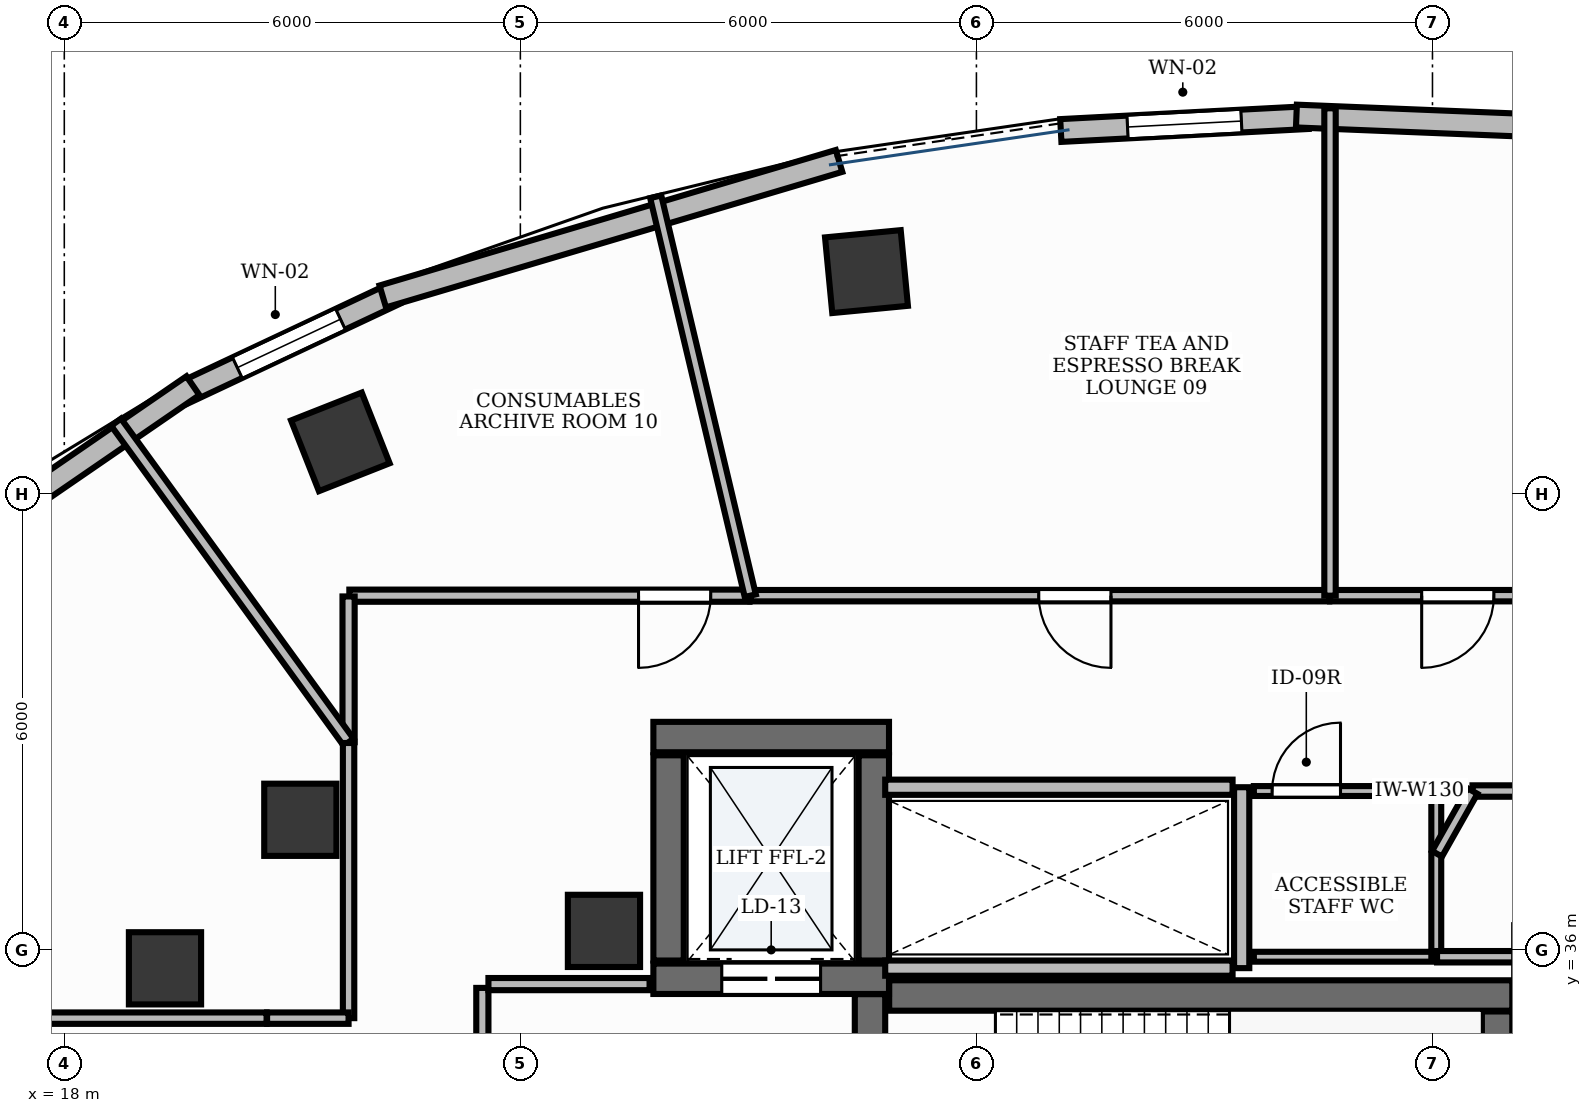
"""IFC4 building model, lengths in metres.
Left out: names, types, materials, properties, quantities, classifications, styles, units other than length and angle.
Written with IfcOpenShell. Run it as: python <this file> out.ifc"""

import sys

from ifc_helpers import new_model, si_unit, direction, frame, frame_2d, origin, origin_2d, place, context, subcontext, project, spatial, rectangle, extrude, element, fill, save


model = new_model("IFC4")
c1 = context("Model", 3, precision=1e-05, world=origin(), true_north=direction((0.0, 1.0)))
c2 = subcontext(c1, "Body", "Model", "MODEL_VIEW")
j1 = project(units=[si_unit("LENGTHUNIT", "METRE"), si_unit("PLANEANGLEUNIT", "RADIAN")], contexts=[c1])
p1 = place(None, origin())
s1 = spatial("IfcSite", under=j1, at=p1, CompositionType="ELEMENT")
p2 = place(p1, origin())
s2 = spatial("IfcBuilding", under=s1, at=p2, CompositionType="ELEMENT")
p3 = place(p2, frame((0.0, 0.0, 200.4)))
s3 = spatial("IfcBuildingStorey", under=s2, at=p3, CompositionType="ELEMENT", Elevation=200.4)
p4 = place(p3, frame((28.852, 35.4, 0.0), z_axis=(0.0, 0.0, 1.0), x_axis=(1.0, 0.0, 0.0)))
e1 = element("IfcWall", 1, at=p4, inside=s3, PredefinedType="SHEAR", context=c2, shape_type="SweptSolid", body=[
    extrude(rectangle(XDim=8.198, YDim=0.4, at=frame_2d((4.099, 0.0))), origin(), (0.0, 0.0, 1.0), 3.9),
])
p5 = place(p3, frame((36.85, 32.11, 0.0), z_axis=(0.0, 0.0, 1.0), x_axis=(0.0, 1.0, 0.0)))
e2 = element("IfcWall", 2, at=p5, inside=s3, PredefinedType="SHEAR", context=c2, shape_type="SweptSolid", body=[
    extrude(rectangle(XDim=3.08, YDim=0.4, at=frame_2d((1.54, 0.0))), origin(), (0.0, 0.0, 1.0), 3.9),
])
p6 = place(p3, frame((28.6, 32.11, 0.0), z_axis=(0.0, 0.0, 1.0), x_axis=(0.0, 1.0, 0.0)))
e3 = element("IfcWall", 3, at=p6, inside=s3, PredefinedType="SHEAR", context=c2, shape_type="SweptSolid", body=[
    extrude(rectangle(XDim=3.308, YDim=0.4, at=frame_2d((1.654, 0.0))), origin(), (0.0, 0.0, 1.0), 3.9),
])
p7 = place(p6, frame((0.2, 0.0, 0.0)))
e4 = element("IfcOpeningElement", 4, at=p7, cuts=e3, PredefinedType="OPENING", context=c2, shape_type="SweptSolid", body=[
    extrude(rectangle(XDim=1.05, YDim=2.15, at=frame_2d((0.525, 1.075))), frame((0.0, 0.215, 0.0), z_axis=(0.0, -1.0, 0.0), x_axis=(1.0, 0.0, 0.0)), (0.0, 0.0, 1.0), 0.43),
])
p8 = place(p3, frame((25.75, 38.8, 0.0), z_axis=(0.0, 0.0, 1.0), x_axis=(1.0, 0.0, 0.0)))
e5 = element("IfcWall", 5, at=p8, inside=s3, PredefinedType="SHEAR", context=c2, shape_type="SweptSolid", body=[
    extrude(rectangle(XDim=3.1, YDim=0.4, at=frame_2d((1.55, 0.0))), origin(), (0.0, 0.0, 1.0), 3.9),
])
p9 = place(p3, frame((25.75, 35.62, 0.0), z_axis=(0.0, 0.0, 1.0), x_axis=(1.0, 0.0, 0.0)))
e6 = element("IfcWall", 6, at=p9, inside=s3, PredefinedType="SHEAR", context=c2, shape_type="SweptSolid", body=[
    extrude(rectangle(XDim=3.1, YDim=0.4, at=frame_2d((1.55, 0.0))), origin(), (0.0, 0.0, 1.0), 3.9),
])
p10 = place(p9, frame((0.9, 0.0, 0.0)))
e7 = element("IfcOpeningElement", 7, at=p10, cuts=e6, PredefinedType="OPENING", context=c2, shape_type="SweptSolid", body=[
    extrude(rectangle(XDim=1.3, YDim=2.2, at=frame_2d((0.65, 1.1))), frame((0.0, 0.215, 0.0), z_axis=(0.0, -1.0, 0.0), x_axis=(1.0, 0.0, 0.0)), (0.0, 0.0, 1.0), 0.43),
])
for number, where, z_axis, x_axis in (
    (8, (25.95, 35.86, 0.0), (0.0, 0.0, 1.0), (0.0, 1.0, 0.0)),
    (9, (28.65, 35.86, 0.0), (0.0, 0.0, 1.0), (0.0, 1.0, 0.0)),
):
    element("IfcWall", number, at=place(p3, frame(where, z_axis=z_axis, x_axis=x_axis)), inside=s3, PredefinedType="SHEAR", context=c2, shape_type="SweptSolid", body=[
        extrude(rectangle(XDim=2.7, YDim=0.4, at=frame_2d((1.35, 0.0))), origin(), (0.0, 0.0, 1.0), 3.9),
    ])
p11 = place(p3, frame((25.1, 36.25, -0.0), z_axis=(0.0, 0.0, 1.0), x_axis=(1.0, 0.0, 0.0)))
e10 = element("IfcColumn", 10, at=p11, inside=s3, PredefinedType="PILASTER", context=c2, shape_type="SweptSolid", body=[
    extrude(rectangle(XDim=0.95, YDim=0.95, at=origin_2d()), origin(), (0.0, 0.0, 1.0), 3.901),
])
for number, where, z_axis, x_axis in (
    (11, (28.554, 44.924, -0.0), (0.0, 0.0, 1.0), (0.995, 0.095, 0.0)),
    (12, (21.632, 42.684, -0.0), (0.0, 0.0, 1.0), (0.93, 0.367, 0.0)),
):
    element("IfcColumn", number, at=place(p3, frame(where, z_axis=z_axis, x_axis=x_axis)), inside=s3, PredefinedType="COLUMN", context=c2, shape_type="SweptSolid", body=[
        extrude(rectangle(XDim=1.0, YDim=1.0, at=origin_2d()), origin(), (0.0, 0.0, 1.0), 3.901),
    ])
for number, where, z_axis, x_axis in (
    (13, (21.105, 37.712, -0.0), (0.0, 0.0, 1.0), (1.0, 0.0, 0.0)),
    (14, (19.325, 35.758, -0.0), (0.0, 0.0, 1.0), (1.0, 0.0, 0.0)),
):
    element("IfcColumn", number, at=place(p3, frame(where, z_axis=z_axis, x_axis=x_axis)), inside=s3, PredefinedType="COLUMN", context=c2, shape_type="SweptSolid", body=[
        extrude(rectangle(XDim=0.95, YDim=0.95, at=origin_2d()), origin(), (0.0, 0.0, 1.0), 3.901),
    ])
p12 = place(p3, frame((34.364, 46.95, 0.0), z_axis=(0.0, 0.0, 1.0), x_axis=(-0.998635162507, -0.052228461639, 0.0)))
e15 = element("IfcWall", 15, at=p12, inside=s3, PredefinedType="STANDARD", context=c2, shape_type="SweptSolid", body=[
    extrude(rectangle(XDim=3.258, YDim=0.3, at=frame_2d((1.629, 0.0))), origin(), (0.0, 0.0, 1.0), 3.9),
])
p13 = place(p12, frame((0.879, 0.0, 0.95)))
e16 = element("IfcOpeningElement", 16, at=p13, cuts=e15, PredefinedType="OPENING", context=c2, shape_type="SweptSolid", body=[
    extrude(rectangle(XDim=1.5, YDim=1.8, at=frame_2d((0.75, 0.9))), frame((0.0, 0.165, 0.0), z_axis=(0.0, -1.0, 0.0), x_axis=(1.0, 0.0, 0.0)), (0.0, 0.0, 1.0), 0.33),
])
p14 = place(p3, frame((22.349, 44.634, 0.0), z_axis=(0.0, 0.0, 1.0), x_axis=(-0.904928207817, -0.425564259188, 0.0)))
e17 = element("IfcWall", 17, at=p14, inside=s3, PredefinedType="STANDARD", context=c2, shape_type="SweptSolid", body=[
    extrude(rectangle(XDim=3.081, YDim=0.3, at=frame_2d((1.541, 0.0))), origin(), (0.0, 0.0, 1.0), 3.47),
])
p15 = place(p14, frame((0.791, 0.0, 0.95)))
e18 = element("IfcOpeningElement", 18, at=p15, cuts=e17, PredefinedType="OPENING", context=c2, shape_type="SweptSolid", body=[
    extrude(rectangle(XDim=1.5, YDim=1.8, at=frame_2d((0.75, 0.9))), frame((0.0, 0.165, 0.0), z_axis=(0.0, -1.0, 0.0), x_axis=(1.0, 0.0, 0.0)), (0.0, 0.0, 1.0), 0.33),
])
p16 = place(p3, frame((37.507, 46.837, 0.0), z_axis=(0.0, 0.0, 1.0), x_axis=(-0.999186472466, 0.040328566059, 0.0)))
e19 = element("IfcWall", 19, at=p16, inside=s3, PredefinedType="STANDARD", context=c2, shape_type="SweptSolid", body=[
    extrude(rectangle(XDim=3.299, YDim=0.3, at=frame_2d((1.65, 0.0))), origin(), (0.0, 0.0, 1.0), 3.9),
])
p17 = place(p3, frame((28.193, 46.379, 0.0), z_axis=(0.0, 0.0, 1.0), x_axis=(-0.95862409447, -0.28467498222, 0.0)))
e20 = element("IfcWall", 20, at=p17, inside=s3, PredefinedType="STANDARD", context=c2, shape_type="SweptSolid", body=[
    extrude(rectangle(XDim=6.262, YDim=0.3, at=frame_2d((3.131, 0.0))), origin(), (0.0, 0.0, 1.0), 3.47),
])
p18 = place(p3, frame((19.692, 43.423, 0.0), z_axis=(0.0, 0.0, 1.0), x_axis=(-0.824151800961, -0.566368968935, 0.0)))
e21 = element("IfcWall", 21, at=p18, inside=s3, PredefinedType="STANDARD", context=c2, shape_type="SweptSolid", body=[
    extrude(rectangle(XDim=5.834, YDim=0.3, at=frame_2d((2.917, 0.0))), origin(), (0.0, 0.0, 1.0), 3.9),
])
p19 = place(p3, frame((33.49, 35.76, 0.0), z_axis=(0.0, 0.0, 1.0), x_axis=(0.0, 1.0, 0.0)))
e22 = element("IfcWall", 22, at=p19, inside=s3, PredefinedType="PARTITIONING", context=c2, shape_type="SweptSolid", body=[
    extrude(rectangle(XDim=2.38, YDim=0.2, at=frame_2d((1.19, 0.0))), origin(), (0.0, 0.0, 1.0), 2.91),
])
for number, where, z_axis, x_axis in (
    (23, (28.8, 35.76, 0.0), (0.0, 0.0, 1.0), (1.0, 0.0, 0.0)),
    (24, (28.8, 38.14, 0.0), (0.0, 0.0, 1.0), (1.0, 0.0, 0.0)),
):
    element("IfcWall", number, at=place(p3, frame(where, z_axis=z_axis, x_axis=x_axis)), inside=s3, PredefinedType="PARTITIONING", context=c2, shape_type="SweptSolid", body=[
        extrude(rectangle(XDim=4.57, YDim=0.2, at=frame_2d((2.285, 0.0))), origin(), (0.0, 0.0, 1.0), 2.91),
    ])
p20 = place(p3, frame((23.5, 32.1, 0.0), z_axis=(0.0, 0.0, 1.0), x_axis=(0.0, 1.0, 0.0)))
e25 = element("IfcWall", 25, at=p20, inside=s3, PredefinedType="PARTITIONING", context=c2, shape_type="SweptSolid", body=[
    extrude(rectangle(XDim=3.4, YDim=0.16, at=frame_2d((1.7, 0.0))), origin(), (0.0, 0.0, 1.0), 2.91),
])
p21 = place(p20, frame((1.175, 0.0, 0.0)))
e26 = element("IfcOpeningElement", 26, at=p21, cuts=e25, PredefinedType="OPENING", context=c2, shape_type="SweptSolid", body=[
    extrude(rectangle(XDim=1.05, YDim=2.15, at=frame_2d((0.525, 1.075))), frame((0.0, 0.095, 0.0), z_axis=(0.0, -1.0, 0.0), x_axis=(1.0, 0.0, 0.0)), (0.0, 0.0, 1.0), 0.19),
])
p22 = place(p3, frame((23.58, 35.55, 0.0), z_axis=(0.0, 0.0, 1.0), x_axis=(1.0, 0.0, 0.0)))
e27 = element("IfcWall", 27, at=p22, inside=s3, PredefinedType="PARTITIONING", context=c2, shape_type="SweptSolid", body=[
    extrude(rectangle(XDim=2.12, YDim=0.16, at=frame_2d((1.06, 0.0))), origin(), (0.0, 0.0, 1.0), 2.91),
])
p23 = place(p3, frame((33.65, 38.09, 0.0), z_axis=(0.0, 0.0, 1.0), x_axis=(1.0, 0.0, 0.0)))
e28 = element("IfcWall", 28, at=p23, inside=s3, PredefinedType="PARTITIONING", context=c2, shape_type="SweptSolid", body=[
    extrude(rectangle(XDim=2.4, YDim=0.13, at=frame_2d((1.2, 0.0))), origin(), (0.0, 0.0, 1.0), 2.91),
])
p24 = place(p23, frame((0.24, 0.0, 0.0)))
e29 = element("IfcOpeningElement", 29, at=p24, cuts=e28, PredefinedType="OPENING", context=c2, shape_type="SweptSolid", body=[
    extrude(rectangle(XDim=0.9, YDim=2.15, at=frame_2d((0.45, 1.075))), frame((0.0, 0.08, 0.0), z_axis=(0.0, -1.0, 0.0), x_axis=(1.0, 0.0, 0.0)), (0.0, 0.0, 1.0), 0.16),
])
p25 = place(p3, frame((37.2, 40.66, 0.0), z_axis=(0.0, 0.0, 1.0), x_axis=(-1.0, 0.0, 0.0)))
e30 = element("IfcWall", 30, at=p25, inside=s3, PredefinedType="PARTITIONING", context=c2, shape_type="SweptSolid", body=[
    extrude(rectangle(XDim=2.548, YDim=0.15, at=frame_2d((1.274, 0.0))), origin(), (0.0, 0.0, 1.0), 2.91),
])
p26 = place(p25, frame((0.392, 0.0, 0.0)))
e31 = element("IfcOpeningElement", 31, at=p26, cuts=e30, PredefinedType="OPENING", context=c2, shape_type="SweptSolid", body=[
    extrude(rectangle(XDim=0.95, YDim=2.15, at=frame_2d((0.475, 1.075))), frame((0.0, 0.09, 0.0), z_axis=(0.0, -1.0, 0.0), x_axis=(1.0, 0.0, 0.0)), (0.0, 0.0, 1.0), 0.18),
])
p27 = place(p3, frame((34.642, 40.66, 0.0), z_axis=(0.0, 0.0, 1.0), x_axis=(-1.0, 0.0, 0.0)))
e32 = element("IfcWall", 32, at=p27, inside=s3, PredefinedType="PARTITIONING", context=c2, shape_type="SweptSolid", body=[
    extrude(rectangle(XDim=7.617, YDim=0.15, at=frame_2d((3.809, 0.0))), origin(), (0.0, 0.0, 1.0), 2.91),
])
p28 = place(p27, frame((2.872, 0.0, 0.0)))
e33 = element("IfcOpeningElement", 33, at=p28, cuts=e32, PredefinedType="OPENING", context=c2, shape_type="SweptSolid", body=[
    extrude(rectangle(XDim=0.95, YDim=2.15, at=frame_2d((0.475, 1.075))), frame((0.0, 0.09, 0.0), z_axis=(0.0, -1.0, 0.0), x_axis=(1.0, 0.0, 0.0)), (0.0, 0.0, 1.0), 0.18),
])
p29 = place(p3, frame((27.015, 40.66, 0.0), z_axis=(0.0, 0.0, 1.0), x_axis=(-1.0, 0.0, 0.0)))
e34 = element("IfcWall", 34, at=p29, inside=s3, PredefinedType="PARTITIONING", context=c2, shape_type="SweptSolid", body=[
    extrude(rectangle(XDim=5.265, YDim=0.16, at=frame_2d((2.632, 0.0))), origin(), (0.0, 0.0, 1.0), 2.91),
])
p30 = place(p29, frame((0.51, 0.0, 0.0)))
e35 = element("IfcOpeningElement", 35, at=p30, cuts=e34, PredefinedType="OPENING", context=c2, shape_type="SweptSolid", body=[
    extrude(rectangle(XDim=0.95, YDim=2.15, at=frame_2d((0.475, 1.075))), frame((0.0, 0.095, 0.0), z_axis=(0.0, -1.0, 0.0), x_axis=(1.0, 0.0, 0.0)), (0.0, 0.0, 1.0), 0.19),
])
p31 = place(p3, frame((36.05, 35.91, 0.0), z_axis=(0.0, 0.0, 1.0), x_axis=(-1.0, 0.0, 0.0)))
e36 = element("IfcWall", 36, at=p31, inside=s3, PredefinedType="PARTITIONING", context=c2, shape_type="SweptSolid", body=[
    extrude(rectangle(XDim=2.4, YDim=0.13, at=frame_2d((1.2, 0.0))), origin(), (0.0, 0.0, 1.0), 2.91),
])
p32 = place(p3, frame((36.05, 38.09, 0.0), z_axis=(0.0, 0.0, 1.0), x_axis=(0.0, -1.0, 0.0)))
e37 = element("IfcWall", 37, at=p32, inside=s3, PredefinedType="PARTITIONING", context=c2, shape_type="SweptSolid", body=[
    extrude(rectangle(XDim=2.18, YDim=0.13, at=frame_2d((1.09, 0.0))), origin(), (0.0, 0.0, 1.0), 2.91),
])
p33 = place(p3, frame((36.526, 38.09, 0.0), z_axis=(0.0, 0.0, 1.0), x_axis=(1.0, 0.0, 0.0)))
e38 = element("IfcWall", 38, at=p33, inside=s3, PredefinedType="PARTITIONING", context=c2, shape_type="SweptSolid", body=[
    extrude(rectangle(XDim=0.674, YDim=0.15, at=frame_2d((0.337, 0.0))), origin(), (0.0, 0.0, 1.0), 2.91),
])
p34 = place(p3, frame((34.652, 40.66, 0.0), z_axis=(0.0, 0.0, 1.0), x_axis=(0.0, 1.0, 0.0)))
e39 = element("IfcWall", 39, at=p34, inside=s3, PredefinedType="PARTITIONING", context=c2, shape_type="SweptSolid", body=[
    extrude(rectangle(XDim=6.412, YDim=0.15, at=frame_2d((3.206, 0.0))), origin(), (0.0, 0.0, 1.0), 2.91),
])
p35 = place(p3, frame((37.35, 35.91, 0.0), z_axis=(0.0, 0.0, 1.0), x_axis=(-1.0, 0.0, 0.0)))
e40 = element("IfcWall", 40, at=p35, inside=s3, PredefinedType="PARTITIONING", context=c2, shape_type="SweptSolid", body=[
    extrude(rectangle(XDim=1.29, YDim=0.15, at=frame_2d((0.645, 0.0))), origin(), (0.0, 0.0, 1.0), 2.91),
])
p36 = place(p3, frame((36.06, 37.264, 0.0), z_axis=(0.0, 0.0, 1.0), x_axis=(0.491641592744, 0.8707976483, 0.0)))
e41 = element("IfcWall", 41, at=p36, inside=s3, PredefinedType="PARTITIONING", context=c2, shape_type="SweptSolid", body=[
    extrude(rectangle(XDim=0.948, YDim=0.15, at=frame_2d((0.474, 0.0))), origin(), (0.0, 0.0, 1.0), 2.91),
])
p37 = place(p3, frame((27.025, 40.66, 0.0), z_axis=(0.0, 0.0, 1.0), x_axis=(-0.230673918081, 0.973031111279, 0.0)))
e42 = element("IfcWall", 42, at=p37, inside=s3, PredefinedType="PARTITIONING", context=c2, shape_type="SweptSolid", body=[
    extrude(rectangle(XDim=5.394, YDim=0.15, at=frame_2d((2.697, 0.0))), origin(), (0.0, 0.0, 1.0), 2.91),
])
p38 = place(p3, frame((21.74, 40.65, 0.0), z_axis=(0.0, 0.0, 1.0), x_axis=(0.0, -1.0, 0.0)))
e43 = element("IfcWall", 43, at=p38, inside=s3, PredefinedType="PARTITIONING", context=c2, shape_type="SweptSolid", body=[
    extrude(rectangle(XDim=1.918, YDim=0.16, at=frame_2d((0.959, 0.0))), origin(), (0.0, 0.0, 1.0), 2.91),
])
p39 = place(p3, frame((21.74, 38.732, 0.0), z_axis=(0.0, 0.0, 1.0), x_axis=(-0.587778316098, 0.80902203377, 0.0)))
e44 = element("IfcWall", 44, at=p39, inside=s3, PredefinedType="PARTITIONING", context=c2, shape_type="SweptSolid", body=[
    extrude(rectangle(XDim=5.204, YDim=0.16, at=frame_2d((2.602, 0.0))), origin(), (0.0, 0.0, 1.0), 2.91),
])
p40 = place(p3, frame((21.74, 38.722, 0.0), z_axis=(0.0, 0.0, 1.0), x_axis=(0.0, -1.0, 0.0)))
e45 = element("IfcWall", 45, at=p40, inside=s3, PredefinedType="PARTITIONING", context=c2, shape_type="SweptSolid", body=[
    extrude(rectangle(XDim=3.62, YDim=0.15, at=frame_2d((1.81, 0.0))), origin(), (0.0, 0.0, 1.0), 2.91),
])
p41 = place(p3, frame((21.74, 35.102, 0.0), z_axis=(0.0, 0.0, 1.0), x_axis=(-1.0, 0.0, 0.0)))
e46 = element("IfcWall", 46, at=p41, inside=s3, PredefinedType="PARTITIONING", context=c2, shape_type="SweptSolid", body=[
    extrude(rectangle(XDim=1.072, YDim=0.15, at=frame_2d((0.536, 0.0))), origin(), (0.0, 0.0, 1.0), 2.91),
])
p42 = place(p3, frame((20.661, 35.102, 0.0), z_axis=(0.0, 0.0, 1.0), x_axis=(-1.0, 0.0, 0.0)))
e47 = element("IfcWall", 47, at=p42, inside=s3, PredefinedType="PARTITIONING", context=c2, shape_type="SweptSolid", body=[
    extrude(rectangle(XDim=3.051, YDim=0.15, at=frame_2d((1.526, 0.0))), origin(), (0.0, 0.0, 1.0), 2.91),
])
p43 = place(p13, origin())
e48 = element("IfcWindow", 48, at=p43, inside=s3, PartitioningType="DOUBLE_PANEL_VERTICAL", PredefinedType="WINDOW", context=c2, shape_type="SweptSolid", body=[
    extrude(rectangle(XDim=1.5, YDim=1.8, at=frame_2d((0.75, 0.9))), frame((0.0, 0.03, 0.0), z_axis=(0.0, -1.0, 0.0), x_axis=(1.0, 0.0, 0.0)), (0.0, 0.0, 1.0), 0.06),
])
fill(e16, e48)
p44 = place(p15, origin())
e49 = element("IfcWindow", 49, at=p44, inside=s3, PartitioningType="DOUBLE_PANEL_VERTICAL", PredefinedType="WINDOW", context=c2, shape_type="SweptSolid", body=[
    extrude(rectangle(XDim=1.5, YDim=1.8, at=frame_2d((0.75, 0.9))), frame((0.0, 0.03, 0.0), z_axis=(0.0, -1.0, 0.0), x_axis=(1.0, 0.0, 0.0)), (0.0, 0.0, 1.0), 0.06),
])
fill(e18, e49)
p45 = place(p10, origin())
e50 = element("IfcDoor", 50, at=p45, inside=s3, OperationType="DOUBLE_DOOR_SLIDING", PredefinedType="DOOR", context=c2, shape_type="SweptSolid", body=[
    extrude(rectangle(XDim=1.3, YDim=2.2, at=frame_2d((0.65, 1.1))), frame((0.0, 0.025, 0.0), z_axis=(0.0, -1.0, 0.0), x_axis=(1.0, 0.0, 0.0)), (0.0, 0.0, 1.0), 0.05),
])
fill(e7, e50)
p46 = place(p24, origin())
e51 = element("IfcDoor", 51, at=p46, inside=s3, OperationType="SINGLE_SWING_RIGHT", PredefinedType="DOOR", context=c2, shape_type="SweptSolid", body=[
    extrude(rectangle(XDim=0.9, YDim=2.15, at=frame_2d((0.45, 1.075))), frame((0.0, 0.025, 0.0), z_axis=(0.0, -1.0, 0.0), x_axis=(1.0, 0.0, 0.0)), (0.0, 0.0, 1.0), 0.05),
])
fill(e29, e51)
p47 = place(p26, origin())
e52 = element("IfcDoor", 52, at=p47, inside=s3, OperationType="SINGLE_SWING_RIGHT", PredefinedType="DOOR", context=c2, shape_type="SweptSolid", body=[
    extrude(rectangle(XDim=0.95, YDim=2.15, at=frame_2d((0.475, 1.075))), frame((0.0, 0.025, 0.0), z_axis=(0.0, -1.0, 0.0), x_axis=(1.0, 0.0, 0.0)), (0.0, 0.0, 1.0), 0.05),
])
fill(e31, e52)
p48 = place(p28, origin())
e53 = element("IfcDoor", 53, at=p48, inside=s3, OperationType="SINGLE_SWING_LEFT", PredefinedType="DOOR", context=c2, shape_type="SweptSolid", body=[
    extrude(rectangle(XDim=0.95, YDim=2.15, at=frame_2d((0.475, 1.075))), frame((0.0, 0.025, 0.0), z_axis=(0.0, -1.0, 0.0), x_axis=(1.0, 0.0, 0.0)), (0.0, 0.0, 1.0), 0.05),
])
fill(e33, e53)
p49 = place(p30, origin())
e54 = element("IfcDoor", 54, at=p49, inside=s3, OperationType="SINGLE_SWING_RIGHT", PredefinedType="DOOR", context=c2, shape_type="SweptSolid", body=[
    extrude(rectangle(XDim=0.95, YDim=2.15, at=frame_2d((0.475, 1.075))), frame((0.0, 0.025, 0.0), z_axis=(0.0, -1.0, 0.0), x_axis=(1.0, 0.0, 0.0)), (0.0, 0.0, 1.0), 0.05),
])
fill(e35, e54)
save(model, sys.argv[1])
